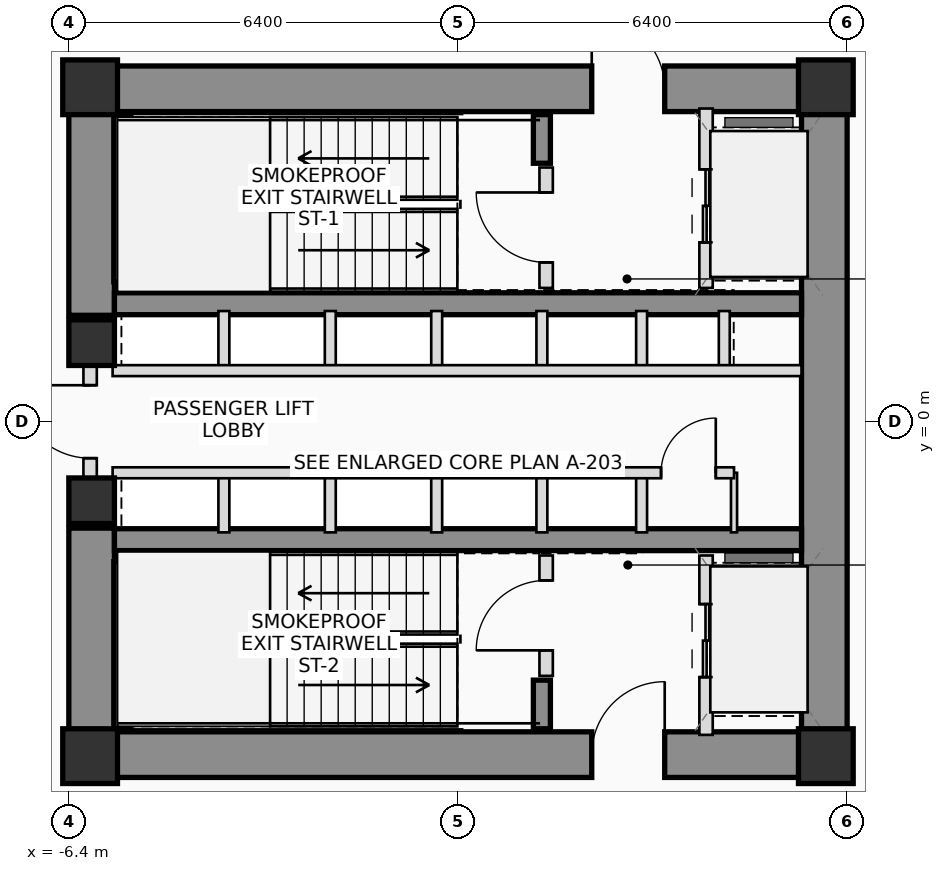
"""IFC4 building model, lengths in metres.
Left out: names, types, materials, properties, quantities, classifications, styles, units other than length and angle.
Written with IfcOpenShell. Run it as: python <this file> out.ifc"""

import sys

from ifc_helpers import new_model, si_unit, direction, frame, frame_2d, origin, origin_2d, place, context, subcontext, project, spatial, rectangle, extrude, source, transform, mapped, element, fill, save


model = new_model("IFC4")
c1 = context("Model", 3, precision=1e-05, world=origin(), true_north=direction((0.0, 1.0)))
c2 = subcontext(c1, "Body", "Model", "MODEL_VIEW")
j1 = project(units=[si_unit("LENGTHUNIT", "METRE"), si_unit("PLANEANGLEUNIT", "RADIAN")], contexts=[c1])
p1 = place(None, origin())
s1 = spatial("IfcSite", under=j1, at=p1, CompositionType="ELEMENT")
p2 = place(p1, origin())
s2 = spatial("IfcBuilding", under=s1, at=p2, CompositionType="ELEMENT")
p3 = place(p2, frame((0.0, 0.0, 12.3)))
s3 = spatial("IfcBuildingStorey", under=s2, at=p3, CompositionType="ELEMENT", Elevation=12.3)
m1 = source(origin(), c2, "Body", "SweptSolid", [
    extrude(rectangle(XDim=0.9, YDim=0.9, at=origin_2d()), origin(), (0.0, 0.0, 1.0), 3.9),
])
for number, where, z_axis, x_axis in (
    (1, (-6.05, -5.5, 0.0), (0.0, 0.0, 1.0), (1.0, 0.0, 0.0)),
    (2, (6.05, -5.5, 0.0), (0.0, 0.0, 1.0), (1.0, 0.0, 0.0)),
    (3, (6.05, 5.5, 0.0), (0.0, 0.0, 1.0), (1.0, 0.0, 0.0)),
    (4, (-6.05, 5.5, 0.0), (0.0, 0.0, 1.0), (1.0, 0.0, 0.0)),
):
    element("IfcColumn", number, at=place(p3, frame(where, z_axis=z_axis, x_axis=x_axis)), inside=s3, PredefinedType="COLUMN", context=c2, shape_type="MappedRepresentation", body=[
        mapped(m1, transform((0.0, 0.0, 0.0), scale=1.0)),
    ])
p4 = place(p3, frame((-6.4, 5.475, 0.0), z_axis=(0.0, 0.0, 1.0), x_axis=(1.0, 0.0, 0.0)))
e5 = element("IfcWall", 5, at=p4, inside=s3, PredefinedType="SHEAR", context=c2, shape_type="SweptSolid", body=[
    extrude(rectangle(XDim=12.8, YDim=0.75, at=frame_2d((6.4, 0.0))), origin(), (0.0, 0.0, 1.0), 3.9),
])
p5 = place(p4, frame((8.6, 0.0, 0.0)))
e6 = element("IfcOpeningElement", 6, at=p5, cuts=e5, PredefinedType="OPENING", context=c2, shape_type="SweptSolid", body=[
    extrude(rectangle(XDim=1.2, YDim=2.2, at=frame_2d((0.6, 1.1))), frame((0.0, 0.385, 0.0), z_axis=(0.0, -1.0, 0.0), x_axis=(1.0, 0.0, 0.0)), (0.0, 0.0, 1.0), 0.77),
])
p6 = place(p3, frame((-6.4, -5.475, 0.0), z_axis=(0.0, 0.0, 1.0), x_axis=(1.0, 0.0, 0.0)))
e7 = element("IfcWall", 7, at=p6, inside=s3, PredefinedType="SHEAR", context=c2, shape_type="SweptSolid", body=[
    extrude(rectangle(XDim=12.8, YDim=0.75, at=frame_2d((6.4, 0.0))), origin(), (0.0, 0.0, 1.0), 3.9),
])
p7 = place(p6, frame((8.6, 0.0, 0.0)))
e8 = element("IfcOpeningElement", 8, at=p7, cuts=e7, PredefinedType="OPENING", context=c2, shape_type="SweptSolid", body=[
    extrude(rectangle(XDim=1.2, YDim=2.2, at=frame_2d((0.6, 1.1))), frame((0.0, 0.385, 0.0), z_axis=(0.0, -1.0, 0.0), x_axis=(1.0, 0.0, 0.0)), (0.0, 0.0, 1.0), 0.77),
])
p8 = place(p3, frame((6.025, -5.1, 0.0), z_axis=(0.0, 0.0, 1.0), x_axis=(0.0, 1.0, 0.0)))
e9 = element("IfcWall", 9, at=p8, inside=s3, PredefinedType="SHEAR", context=c2, shape_type="SweptSolid", body=[
    extrude(rectangle(XDim=10.2, YDim=0.75, at=frame_2d((5.1, 0.0))), origin(), (0.0, 0.0, 1.0), 3.9),
])
for number, where, z_axis, x_axis in (
    (10, (-6.025, -5.1, 0.0), (0.0, 0.0, 1.0), (0.0, 1.0, 0.0)),
    (11, (-6.025, 1.75, 0.0), (0.0, 0.0, 1.0), (0.0, 1.0, 0.0)),
):
    element("IfcWall", number, at=place(p3, frame(where, z_axis=z_axis, x_axis=x_axis)), inside=s3, PredefinedType="SHEAR", context=c2, shape_type="SweptSolid", body=[
        extrude(rectangle(XDim=3.35, YDim=0.75, at=frame_2d((1.675, 0.0))), origin(), (0.0, 0.0, 1.0), 3.9),
    ])
for number, where, z_axis, x_axis in (
    (12, (-5.65, 1.94, 0.0), (0.0, 0.0, 1.0), (1.0, 0.0, 0.0)),
    (13, (-5.65, -1.94, 0.0), (0.0, 0.0, 1.0), (1.0, 0.0, 0.0)),
):
    element("IfcWall", number, at=place(p3, frame(where, z_axis=z_axis, x_axis=x_axis)), inside=s3, PredefinedType="SHEAR", context=c2, shape_type="SweptSolid", body=[
        extrude(rectangle(XDim=11.3, YDim=0.36, at=frame_2d((5.65, 0.0))), origin(), (0.0, 0.0, 1.0), 3.9),
    ])
p9 = place(p3, frame((-5.52, 2.3, 0.0), z_axis=(0.0, 0.0, 1.0), x_axis=(0.0, 1.0, 0.0)))
e14 = element("IfcWall", 14, at=p9, inside=s3, PredefinedType="SHEAR", context=c2, shape_type="SweptSolid", body=[
    extrude(rectangle(XDim=2.75, YDim=0.28, at=frame_2d((1.375, 0.0))), origin(), (0.0, 0.0, 1.0), 3.9),
])
p10 = place(p3, frame((1.38, 4.25, 0.0), z_axis=(0.0, 0.0, 1.0), x_axis=(0.0, 1.0, 0.0)))
e15 = element("IfcWall", 15, at=p10, inside=s3, PredefinedType="SHEAR", context=c2, shape_type="SweptSolid", body=[
    extrude(rectangle(XDim=0.8, YDim=0.28, at=frame_2d((0.4, 0.0))), origin(), (0.0, 0.0, 1.0), 3.9),
])
p11 = place(p3, frame((-5.52, -5.05, 0.0), z_axis=(0.0, 0.0, 1.0), x_axis=(0.0, 1.0, 0.0)))
e16 = element("IfcWall", 16, at=p11, inside=s3, PredefinedType="SHEAR", context=c2, shape_type="SweptSolid", body=[
    extrude(rectangle(XDim=2.75, YDim=0.28, at=frame_2d((1.375, 0.0))), origin(), (0.0, 0.0, 1.0), 3.9),
])
p12 = place(p3, frame((1.38, -5.05, 0.0), z_axis=(0.0, 0.0, 1.0), x_axis=(0.0, 1.0, 0.0)))
e17 = element("IfcWall", 17, at=p12, inside=s3, PredefinedType="SHEAR", context=c2, shape_type="SweptSolid", body=[
    extrude(rectangle(XDim=0.8, YDim=0.28, at=frame_2d((0.4, 0.0))), origin(), (0.0, 0.0, 1.0), 3.9),
])
m2 = source(origin(), c2, "Body", "SweptSolid", [
    extrude(rectangle(XDim=0.75, YDim=0.75, at=origin_2d()), origin(), (0.0, 0.0, 1.0), 3.9),
])
for number, where, z_axis, x_axis in (
    (18, (-6.025, -1.3, 0.0), (0.0, 0.0, 1.0), (1.0, 0.0, 0.0)),
    (19, (-6.025, 1.3, 0.0), (0.0, 0.0, 1.0), (1.0, 0.0, 0.0)),
):
    element("IfcColumn", number, at=place(p3, frame(where, z_axis=z_axis, x_axis=x_axis)), inside=s3, PredefinedType="COLUMN", context=c2, shape_type="MappedRepresentation", body=[
        mapped(m2, transform((0.0, 0.0, 0.0), scale=1.0)),
    ])
p13 = place(p3, frame((-6.05, -0.95, 0.0), z_axis=(0.0, 0.0, 1.0), x_axis=(0.0, 1.0, 0.0)))
e20 = element("IfcWall", 20, at=p13, inside=s3, PredefinedType="PLUMBINGWALL", context=c2, shape_type="SweptSolid", body=[
    extrude(rectangle(XDim=1.9, YDim=0.22, at=frame_2d((0.95, 0.0))), origin(), (0.0, 0.0, 1.0), 2.55),
])
p14 = place(p13, frame((0.35, 0.0, 0.0)))
e21 = element("IfcOpeningElement", 21, at=p14, cuts=e20, PredefinedType="OPENING", context=c2, shape_type="SweptSolid", body=[
    extrude(rectangle(XDim=1.2, YDim=2.2, at=frame_2d((0.6, 1.1))), frame((0.0, 0.12, 0.0), z_axis=(0.0, -1.0, 0.0), x_axis=(1.0, 0.0, 0.0)), (0.0, 0.0, 1.0), 0.24),
])
p15 = place(p3, frame((1.45, 2.2, 0.0), z_axis=(0.0, 0.0, 1.0), x_axis=(0.0, 1.0, 0.0)))
e22 = element("IfcWall", 22, at=p15, inside=s3, PredefinedType="PLUMBINGWALL", context=c2, shape_type="SweptSolid", body=[
    extrude(rectangle(XDim=1.98, YDim=0.22, at=frame_2d((0.99, 0.0))), origin(), (0.0, 0.0, 1.0), 3.57),
])
p16 = place(p15, frame((0.42, 0.0, 0.0)))
e23 = element("IfcOpeningElement", 23, at=p16, cuts=e22, PredefinedType="OPENING", context=c2, shape_type="SweptSolid", body=[
    extrude(rectangle(XDim=1.15, YDim=2.15, at=frame_2d((0.575, 1.075))), frame((0.0, 0.12, 0.0), z_axis=(0.0, -1.0, 0.0), x_axis=(1.0, 0.0, 0.0)), (0.0, 0.0, 1.0), 0.24),
])
p17 = place(p3, frame((4.08, 2.2, 0.0), z_axis=(0.0, 0.0, 1.0), x_axis=(0.0, 1.0, 0.0)))
e24 = element("IfcWall", 24, at=p17, inside=s3, PredefinedType="PLUMBINGWALL", context=c2, shape_type="SweptSolid", body=[
    extrude(rectangle(XDim=2.95, YDim=0.22, at=frame_2d((1.475, 0.0))), origin(), (0.0, 0.0, 1.0), 3.57),
])
p18 = place(p17, frame((0.75, 0.0, 0.0)))
e25 = element("IfcOpeningElement", 25, at=p18, cuts=e24, PredefinedType="OPENING", context=c2, shape_type="SweptSolid", body=[
    extrude(rectangle(XDim=1.2, YDim=2.25, at=frame_2d((0.6, 1.125))), frame((0.0, 0.12, 0.0), z_axis=(0.0, -1.0, 0.0), x_axis=(1.0, 0.0, 0.0)), (0.0, 0.0, 1.0), 0.24),
])
p19 = place(p3, frame((1.45, -4.18, 0.0), z_axis=(0.0, 0.0, 1.0), x_axis=(0.0, 1.0, 0.0)))
e26 = element("IfcWall", 26, at=p19, inside=s3, PredefinedType="PLUMBINGWALL", context=c2, shape_type="SweptSolid", body=[
    extrude(rectangle(XDim=1.98, YDim=0.22, at=frame_2d((0.99, 0.0))), origin(), (0.0, 0.0, 1.0), 3.57),
])
p20 = place(p19, frame((0.42, 0.0, 0.0)))
e27 = element("IfcOpeningElement", 27, at=p20, cuts=e26, PredefinedType="OPENING", context=c2, shape_type="SweptSolid", body=[
    extrude(rectangle(XDim=1.15, YDim=2.15, at=frame_2d((0.575, 1.075))), frame((0.0, 0.12, 0.0), z_axis=(0.0, -1.0, 0.0), x_axis=(1.0, 0.0, 0.0)), (0.0, 0.0, 1.0), 0.24),
])
p21 = place(p3, frame((4.08, -5.15, 0.0), z_axis=(0.0, 0.0, 1.0), x_axis=(0.0, 1.0, 0.0)))
e28 = element("IfcWall", 28, at=p21, inside=s3, PredefinedType="PLUMBINGWALL", context=c2, shape_type="SweptSolid", body=[
    extrude(rectangle(XDim=2.95, YDim=0.22, at=frame_2d((1.475, 0.0))), origin(), (0.0, 0.0, 1.0), 3.57),
])
p22 = place(p21, frame((0.95, 0.0, 0.0)))
e29 = element("IfcOpeningElement", 29, at=p22, cuts=e28, PredefinedType="OPENING", context=c2, shape_type="SweptSolid", body=[
    extrude(rectangle(XDim=1.2, YDim=2.25, at=frame_2d((0.6, 1.125))), frame((0.0, 0.12, 0.0), z_axis=(0.0, -1.0, 0.0), x_axis=(1.0, 0.0, 0.0)), (0.0, 0.0, 1.0), 0.24),
])
for number, where, z_axis, x_axis in (
    (30, (-3.85, 0.84, 0.0), (0.0, 0.0, 1.0), (0.0, 1.0, 0.0)),
    (31, (-3.85, -1.82, 0.0), (0.0, 0.0, 1.0), (0.0, 1.0, 0.0)),
    (32, (-2.1, 0.84, 0.0), (0.0, 0.0, 1.0), (0.0, 1.0, 0.0)),
    (33, (-2.1, -1.82, 0.0), (0.0, 0.0, 1.0), (0.0, 1.0, 0.0)),
    (34, (-0.35, 0.84, 0.0), (0.0, 0.0, 1.0), (0.0, 1.0, 0.0)),
    (35, (-0.35, -1.82, 0.0), (0.0, 0.0, 1.0), (0.0, 1.0, 0.0)),
    (36, (1.38, 0.84, 0.0), (0.0, 0.0, 1.0), (0.0, 1.0, 0.0)),
    (37, (1.38, -1.82, 0.0), (0.0, 0.0, 1.0), (0.0, 1.0, 0.0)),
    (38, (3.02, 0.84, 0.0), (0.0, 0.0, 1.0), (0.0, 1.0, 0.0)),
    (39, (4.38, 0.84, 0.0), (0.0, 0.0, 1.0), (0.0, 1.0, 0.0)),
    (40, (3.02, -1.82, 0.0), (0.0, 0.0, 1.0), (0.0, 1.0, 0.0)),
):
    element("IfcWall", number, at=place(p3, frame(where, z_axis=z_axis, x_axis=x_axis)), inside=s3, PredefinedType="PLUMBINGWALL", context=c2, shape_type="SweptSolid", body=[
        extrude(rectangle(XDim=0.98, YDim=0.18, at=frame_2d((0.49, 0.0))), origin(), (0.0, 0.0, 1.0), 3.57),
    ])
p23 = place(p3, frame((4.54, -1.82, 0.0), z_axis=(0.0, 0.0, 1.0), x_axis=(0.0, 1.0, 0.0)))
e41 = element("IfcWall", 41, at=p23, inside=s3, PredefinedType="PARTITIONING", context=c2, shape_type="SweptSolid", body=[
    extrude(rectangle(XDim=0.98, YDim=0.1, at=frame_2d((0.49, 0.0))), origin(), (0.0, 0.0, 1.0), 3.57),
])
p24 = place(p3, frame((-5.68, 0.84, 0.0), z_axis=(0.0, 0.0, 1.0), x_axis=(1.0, 0.0, 0.0)))
e42 = element("IfcWall", 42, at=p24, inside=s3, PredefinedType="PLUMBINGWALL", context=c2, shape_type="SweptSolid", body=[
    extrude(rectangle(XDim=11.33, YDim=0.18, at=frame_2d((5.665, 0.0))), origin(), (0.0, 0.0, 1.0), 3.57),
])
p25 = place(p3, frame((-5.68, -0.84, 0.0), z_axis=(0.0, 0.0, 1.0), x_axis=(1.0, 0.0, 0.0)))
e43 = element("IfcWall", 43, at=p25, inside=s3, PredefinedType="PLUMBINGWALL", context=c2, shape_type="SweptSolid", body=[
    extrude(rectangle(XDim=10.22, YDim=0.18, at=frame_2d((5.11, 0.0))), origin(), (0.0, 0.0, 1.0), 3.57),
])
p26 = place(p25, frame((9.02, 0.0, 0.0)))
e44 = element("IfcOpeningElement", 44, at=p26, cuts=e43, PredefinedType="OPENING", context=c2, shape_type="SweptSolid", body=[
    extrude(rectangle(XDim=0.9, YDim=2.05, at=frame_2d((0.45, 1.025))), frame((0.0, 0.1, 0.0), z_axis=(0.0, -1.0, 0.0), x_axis=(1.0, 0.0, 0.0)), (0.0, 0.0, 1.0), 0.2),
])
p27 = place(p5, origin())
e45 = element("IfcDoor", 45, at=p27, inside=s3, OperationType="SINGLE_SWING_LEFT", PredefinedType="DOOR", context=c2, shape_type="SweptSolid", body=[
    extrude(rectangle(XDim=1.2, YDim=2.2, at=frame_2d((0.6, 1.1))), frame((0.0, 0.025, 0.0), z_axis=(0.0, -1.0, 0.0), x_axis=(1.0, 0.0, 0.0)), (0.0, 0.0, 1.0), 0.05),
])
fill(e6, e45)
p28 = place(p7, origin())
e46 = element("IfcDoor", 46, at=p28, inside=s3, OperationType="SINGLE_SWING_RIGHT", PredefinedType="DOOR", context=c2, shape_type="SweptSolid", body=[
    extrude(rectangle(XDim=1.2, YDim=2.2, at=frame_2d((0.6, 1.1))), frame((0.0, 0.025, 0.0), z_axis=(0.0, -1.0, 0.0), x_axis=(1.0, 0.0, 0.0)), (0.0, 0.0, 1.0), 0.05),
])
fill(e8, e46)
p29 = place(p14, origin())
e47 = element("IfcDoor", 47, at=p29, inside=s3, OperationType="SINGLE_SWING_RIGHT", PredefinedType="DOOR", context=c2, shape_type="SweptSolid", body=[
    extrude(rectangle(XDim=1.2, YDim=2.2, at=frame_2d((0.6, 1.1))), frame((0.0, 0.025, 0.0), z_axis=(0.0, -1.0, 0.0), x_axis=(1.0, 0.0, 0.0)), (0.0, 0.0, 1.0), 0.05),
])
fill(e21, e47)
p30 = place(p16, origin())
e48 = element("IfcDoor", 48, at=p30, inside=s3, OperationType="SINGLE_SWING_RIGHT", PredefinedType="DOOR", context=c2, shape_type="SweptSolid", body=[
    extrude(rectangle(XDim=1.15, YDim=2.15, at=frame_2d((0.575, 1.075))), frame((0.0, 0.025, 0.0), z_axis=(0.0, -1.0, 0.0), x_axis=(1.0, 0.0, 0.0)), (0.0, 0.0, 1.0), 0.05),
])
fill(e23, e48)
p31 = place(p18, origin())
e49 = element("IfcDoor", 49, at=p31, inside=s3, OperationType="DOUBLE_DOOR_SLIDING", PredefinedType="DOOR", context=c2, shape_type="SweptSolid", body=[
    extrude(rectangle(XDim=1.2, YDim=2.25, at=frame_2d((0.6, 1.125))), frame((0.0, 0.025, 0.0), z_axis=(0.0, -1.0, 0.0), x_axis=(1.0, 0.0, 0.0)), (0.0, 0.0, 1.0), 0.05),
])
fill(e25, e49)
p32 = place(p20, origin())
e50 = element("IfcDoor", 50, at=p32, inside=s3, OperationType="SINGLE_SWING_LEFT", PredefinedType="DOOR", context=c2, shape_type="SweptSolid", body=[
    extrude(rectangle(XDim=1.15, YDim=2.15, at=frame_2d((0.575, 1.075))), frame((0.0, 0.025, 0.0), z_axis=(0.0, -1.0, 0.0), x_axis=(1.0, 0.0, 0.0)), (0.0, 0.0, 1.0), 0.05),
])
fill(e27, e50)
p33 = place(p22, origin())
e51 = element("IfcDoor", 51, at=p33, inside=s3, OperationType="DOUBLE_DOOR_SLIDING", PredefinedType="DOOR", context=c2, shape_type="SweptSolid", body=[
    extrude(rectangle(XDim=1.2, YDim=2.25, at=frame_2d((0.6, 1.125))), frame((0.0, 0.025, 0.0), z_axis=(0.0, -1.0, 0.0), x_axis=(1.0, 0.0, 0.0)), (0.0, 0.0, 1.0), 0.05),
])
fill(e29, e51)
p34 = place(p26, origin())
e52 = element("IfcDoor", 52, at=p34, inside=s3, OperationType="SINGLE_SWING_RIGHT", PredefinedType="DOOR", context=c2, shape_type="SweptSolid", body=[
    extrude(rectangle(XDim=0.9, YDim=2.05, at=frame_2d((0.45, 1.025))), frame((0.0, 0.025, 0.0), z_axis=(0.0, -1.0, 0.0), x_axis=(1.0, 0.0, 0.0)), (0.0, 0.0, 1.0), 0.05),
])
fill(e44, e52)
save(model, sys.argv[1])
